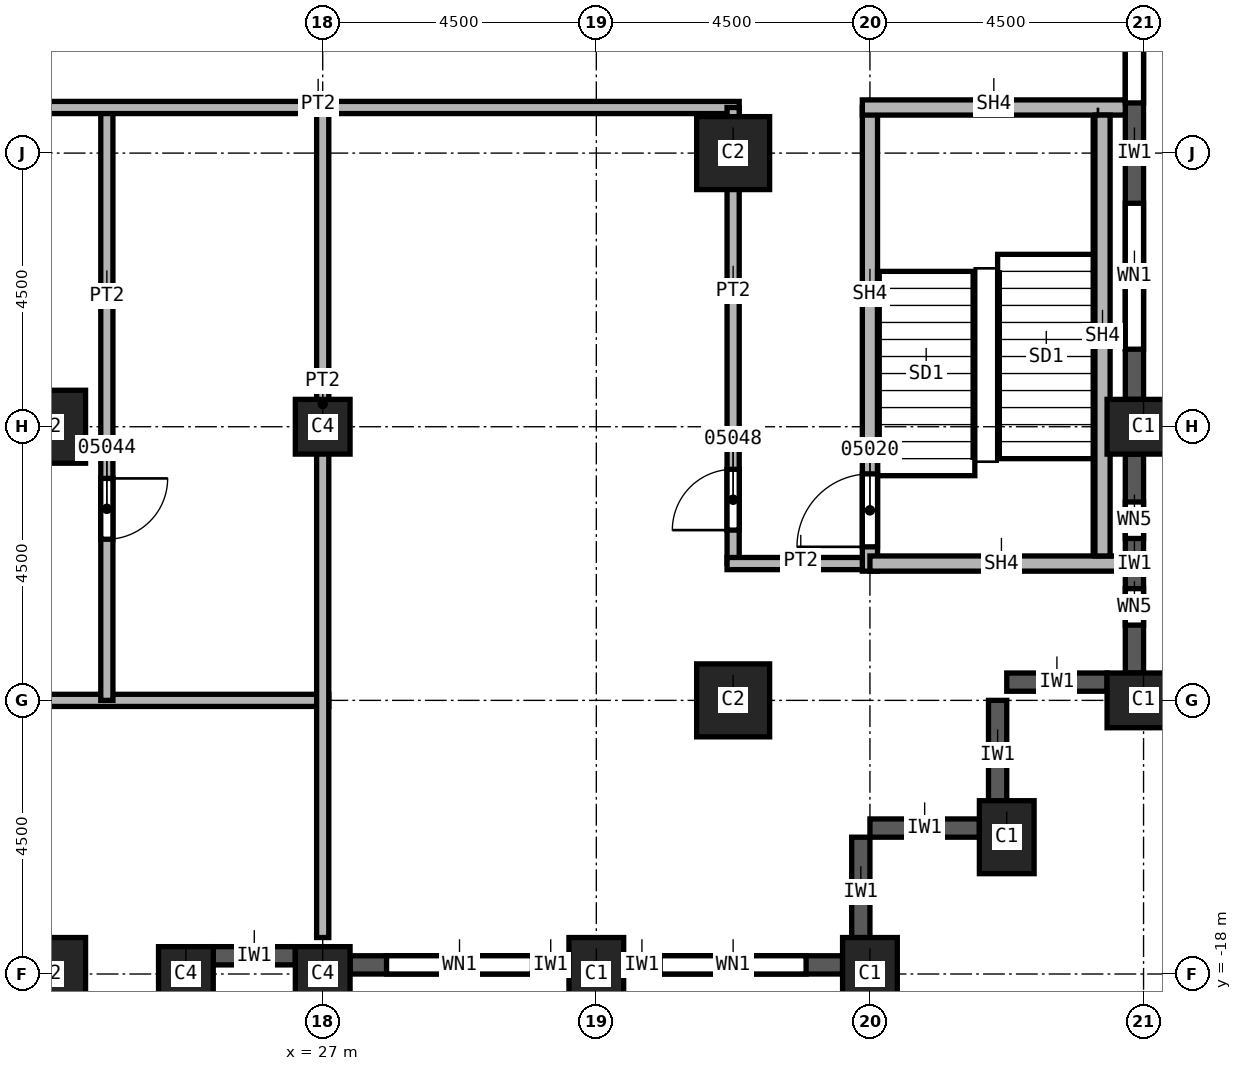
"""IFC4 building model, lengths in metres.
Left out: names, types, materials, properties, quantities, classifications, styles, units other than length and angle.
Written with IfcOpenShell. Run it as: python <this file> out.ifc"""

import sys

from ifc_helpers import new_model, si_unit, direction, frame, frame_2d, origin, origin_2d, place, context, subcontext, project, spatial, rectangle, extrude, element, fill, save


model = new_model("IFC4")
c1 = context("Model", 3, precision=1e-05, world=origin(), true_north=direction((0.0, 1.0)))
c2 = subcontext(c1, "Body", "Model", "MODEL_VIEW")
j1 = project(units=[si_unit("LENGTHUNIT", "METRE"), si_unit("PLANEANGLEUNIT", "RADIAN")], contexts=[c1])
p1 = place(None, origin())
s1 = spatial("IfcSite", under=j1, at=p1, CompositionType="ELEMENT")
p2 = place(p1, origin())
s2 = spatial("IfcBuilding", under=s1, at=p2, CompositionType="ELEMENT")
p3 = place(p2, frame((0.0, 0.0, 112.0)))
s3 = spatial("IfcBuildingStorey", under=s2, at=p3, CompositionType="ELEMENT", Elevation=112.0)
for number, where, z_axis, x_axis in (
    (1, (40.5, -9.0, 0.0), (0.0, 0.0, 1.0), (0.0, 1.0, 0.0)),
    (2, (40.5, -13.5, 0.0), (0.0, 0.0, 1.0), (0.0, 1.0, 0.0)),
    (3, (38.25, -15.75, 0.0), (0.0, 0.0, 1.0), (1.0, 0.0, 0.0)),
    (4, (31.5, -18.0, 0.0), (0.0, 0.0, 1.0), (1.0, 0.0, 0.0)),
    (5, (36.0, -18.0, 0.0), (0.0, 0.0, 1.0), (1.0, 0.0, 0.0)),
):
    element("IfcColumn", number, at=place(p3, frame(where, z_axis=z_axis, x_axis=x_axis)), inside=s3, PredefinedType="COLUMN", context=c2, shape_type="SweptSolid", body=[
        extrude(rectangle(XDim=0.9, YDim=1.2, at=origin_2d()), origin(), (0.0, 0.0, 1.0), 3.7),
    ])
for number, where, z_axis, x_axis in (
    (6, (33.75, -4.5, 0.0), (0.0, 0.0, 1.0), (1.0, 0.0, 0.0)),
    (7, (33.75, -13.5, 0.0), (0.0, 0.0, 1.0), (1.0, 0.0, 0.0)),
    (8, (22.5, -9.0, 0.0), (0.0, 0.0, 1.0), (1.0, 0.0, 0.0)),
    (9, (22.5, -18.0, 0.0), (0.0, 0.0, 1.0), (1.0, 0.0, 0.0)),
):
    element("IfcColumn", number, at=place(p3, frame(where, z_axis=z_axis, x_axis=x_axis)), inside=s3, PredefinedType="COLUMN", context=c2, shape_type="SweptSolid", body=[
        extrude(rectangle(XDim=1.2, YDim=1.2, at=origin_2d()), origin(), (0.0, 0.0, 1.0), 3.7),
    ])
for number, where, z_axis, x_axis in (
    (10, (27.0, -9.0, 0.0), (0.0, 0.0, 1.0), (1.0, 0.0, 0.0)),
    (11, (27.0, -18.0, 0.0), (0.0, 0.0, 1.0), (1.0, 0.0, 0.0)),
    (12, (24.75, -18.0, 0.0), (0.0, 0.0, 1.0), (1.0, 0.0, 0.0)),
):
    element("IfcColumn", number, at=place(p3, frame(where, z_axis=z_axis, x_axis=x_axis)), inside=s3, PredefinedType="COLUMN", context=c2, shape_type="SweptSolid", body=[
        extrude(rectangle(XDim=0.9, YDim=0.9, at=origin_2d()), origin(), (0.0, 0.0, 1.0), 3.7),
    ])
for number, where, z_axis, x_axis in (
    (13, (35.85, -17.55, 0.0), (0.0, 0.0, 1.0), (0.0, 1.0, 0.0)),
    (14, (37.8, -15.6, 0.0), (0.0, 0.0, 1.0), (-1.0, 0.0, 0.0)),
    (15, (38.1, -15.3, 0.0), (0.0, 0.0, 1.0), (0.0, 1.0, 0.0)),
):
    element("IfcWall", number, at=place(p3, frame(where, z_axis=z_axis, x_axis=x_axis)), inside=s3, PredefinedType="SOLIDWALL", context=c2, shape_type="SweptSolid", body=[
        extrude(rectangle(XDim=1.8, YDim=0.3, at=frame_2d((0.9, 0.0))), origin(), (0.0, 0.0, 1.0), 3.1),
    ])
p4 = place(p3, frame((39.9, -13.2, 0.0), z_axis=(0.0, 0.0, 1.0), x_axis=(-1.0, 0.0, 0.0)))
e16 = element("IfcWall", 16, at=p4, inside=s3, PredefinedType="SOLIDWALL", context=c2, shape_type="SweptSolid", body=[
    extrude(rectangle(XDim=1.65, YDim=0.3, at=frame_2d((0.825, 0.0))), origin(), (0.0, 0.0, 1.0), 3.1),
])
p5 = place(p3, frame((25.2, -17.7, 0.0), z_axis=(0.0, 0.0, 1.0), x_axis=(1.0, 0.0, 0.0)))
e17 = element("IfcWall", 17, at=p5, inside=s3, PredefinedType="SOLIDWALL", context=c2, shape_type="SweptSolid", body=[
    extrude(rectangle(XDim=1.35, YDim=0.3, at=frame_2d((0.675, 0.0))), origin(), (0.0, 0.0, 1.0), 3.1),
])
p6 = place(p3, frame((27.45, -17.85, 0.0), z_axis=(0.0, 0.0, 1.0), x_axis=(1.0, 0.0, 0.0)))
e18 = element("IfcWall", 18, at=p6, inside=s3, PredefinedType="SOLIDWALL", context=c2, shape_type="SweptSolid", body=[
    extrude(rectangle(XDim=3.6, YDim=0.3, at=frame_2d((1.8, 0.0))), origin(), (0.0, 0.0, 1.0), 3.1),
])
p7 = place(p6, frame((0.6, 0.0, 0.8)))
e19 = element("IfcOpeningElement", 19, at=p7, cuts=e18, PredefinedType="OPENING", context=c2, shape_type="SweptSolid", body=[
    extrude(rectangle(XDim=2.4, YDim=1.95, at=frame_2d((1.2, 0.975))), frame((0.0, 0.15, 0.0), z_axis=(0.0, -1.0, 0.0), x_axis=(1.0, 0.0, 0.0)), (0.0, 0.0, 1.0), 0.3),
])
p8 = place(p3, frame((31.95, -17.85, 0.0), z_axis=(0.0, 0.0, 1.0), x_axis=(1.0, 0.0, 0.0)))
e20 = element("IfcWall", 20, at=p8, inside=s3, PredefinedType="SOLIDWALL", context=c2, shape_type="SweptSolid", body=[
    extrude(rectangle(XDim=3.6, YDim=0.3, at=frame_2d((1.8, 0.0))), origin(), (0.0, 0.0, 1.0), 3.1),
])
p9 = place(p8, frame((0.6, 0.0, 0.8)))
e21 = element("IfcOpeningElement", 21, at=p9, cuts=e20, PredefinedType="OPENING", context=c2, shape_type="SweptSolid", body=[
    extrude(rectangle(XDim=2.4, YDim=1.95, at=frame_2d((1.2, 0.975))), frame((0.0, 0.15, 0.0), z_axis=(0.0, -1.0, 0.0), x_axis=(1.0, 0.0, 0.0)), (0.0, 0.0, 1.0), 0.3),
])
p10 = place(p3, frame((40.35, -13.05, 0.0), z_axis=(0.0, 0.0, 1.0), x_axis=(0.0, 1.0, 0.0)))
e22 = element("IfcWall", 22, at=p10, inside=s3, PredefinedType="SOLIDWALL", context=c2, shape_type="SweptSolid", body=[
    extrude(rectangle(XDim=3.6, YDim=0.3, at=frame_2d((1.8, 0.0))), origin(), (0.0, 0.0, 1.0), 3.1),
])
p11 = place(p10, frame((0.788, 0.0, 0.8)))
e23 = element("IfcOpeningElement", 23, at=p11, cuts=e22, PredefinedType="OPENING", context=c2, shape_type="SweptSolid", body=[
    extrude(rectangle(XDim=0.6, YDim=1.95, at=frame_2d((0.3, 0.975))), frame((0.0, 0.15, 0.0), z_axis=(0.0, -1.0, 0.0), x_axis=(1.0, 0.0, 0.0)), (0.0, 0.0, 1.0), 0.3),
])
p12 = place(p10, frame((2.212, 0.0, 0.8)))
e24 = element("IfcOpeningElement", 24, at=p12, cuts=e22, PredefinedType="OPENING", context=c2, shape_type="SweptSolid", body=[
    extrude(rectangle(XDim=0.6, YDim=1.95, at=frame_2d((0.3, 0.975))), frame((0.0, 0.15, 0.0), z_axis=(0.0, -1.0, 0.0), x_axis=(1.0, 0.0, 0.0)), (0.0, 0.0, 1.0), 0.3),
])
p13 = place(p3, frame((40.35, -8.55, 0.0), z_axis=(0.0, 0.0, 1.0), x_axis=(0.0, 1.0, 0.0)))
e25 = element("IfcWall", 25, at=p13, inside=s3, PredefinedType="SOLIDWALL", context=c2, shape_type="SweptSolid", body=[
    extrude(rectangle(XDim=8.1, YDim=0.3, at=frame_2d((4.05, 0.0))), origin(), (0.0, 0.0, 1.0), 3.1),
])
p14 = place(p13, frame((0.825, 0.0, 0.8)))
e26 = element("IfcOpeningElement", 26, at=p14, cuts=e25, PredefinedType="OPENING", context=c2, shape_type="SweptSolid", body=[
    extrude(rectangle(XDim=2.4, YDim=1.95, at=frame_2d((1.2, 0.975))), frame((0.0, 0.15, 0.0), z_axis=(0.0, -1.0, 0.0), x_axis=(1.0, 0.0, 0.0)), (0.0, 0.0, 1.0), 0.3),
])
p15 = place(p13, frame((4.875, 0.0, 0.8)))
e27 = element("IfcOpeningElement", 27, at=p15, cuts=e25, PredefinedType="OPENING", context=c2, shape_type="SweptSolid", body=[
    extrude(rectangle(XDim=2.4, YDim=1.95, at=frame_2d((1.2, 0.975))), frame((0.0, 0.15, 0.0), z_axis=(0.0, -1.0, 0.0), x_axis=(1.0, 0.0, 0.0)), (0.0, 0.0, 1.0), 0.3),
])
p16 = place(p3, frame((19.9, -13.5, 0.0), z_axis=(0.0, 0.0, 1.0), x_axis=(1.0, 0.0, 0.0)))
e28 = element("IfcWall", 28, at=p16, inside=s3, PredefinedType="PARTITIONING", context=c2, shape_type="SweptSolid", body=[
    extrude(rectangle(XDim=7.2, YDim=0.2, at=frame_2d((3.6, 0.0))), origin(), (0.0, 0.0, 1.0), 3.7),
])
p17 = place(p3, frame((23.45, -3.75, 0.0), z_axis=(0.0, 0.0, 1.0), x_axis=(0.0, -1.0, 0.0)))
e29 = element("IfcWall", 29, at=p17, inside=s3, PredefinedType="PARTITIONING", context=c2, shape_type="SweptSolid", body=[
    extrude(rectangle(XDim=9.75, YDim=0.2, at=frame_2d((4.875, 0.0))), origin(), (0.0, 0.0, 1.0), 3.7),
])
p18 = place(p17, frame((6.1, 0.0, 0.0)))
e30 = element("IfcOpeningElement", 30, at=p18, cuts=e29, PredefinedType="OPENING", context=c2, shape_type="SweptSolid", body=[
    extrude(rectangle(XDim=1.0, YDim=2.1, at=frame_2d((0.5, 1.05))), frame((0.0, 0.1, 0.0), z_axis=(0.0, -1.0, 0.0), x_axis=(1.0, 0.0, 0.0)), (0.0, 0.0, 1.0), 0.2),
])
p19 = place(p3, frame((33.85, -3.75, 0.0), z_axis=(0.0, 0.0, 1.0), x_axis=(-1.0, 0.0, 0.0)))
e31 = element("IfcWall", 31, at=p19, inside=s3, PredefinedType="PARTITIONING", context=c2, shape_type="SweptSolid", body=[
    extrude(rectangle(XDim=13.95, YDim=0.2, at=frame_2d((6.975, 0.0))), origin(), (0.0, 0.0, 1.0), 3.7),
])
p20 = place(p3, frame((27.0, -3.75, 0.0), z_axis=(0.0, 0.0, 1.0), x_axis=(0.0, -1.0, 0.0)))
e32 = element("IfcWall", 32, at=p20, inside=s3, PredefinedType="PARTITIONING", context=c2, shape_type="SweptSolid", body=[
    extrude(rectangle(XDim=13.65, YDim=0.2, at=frame_2d((6.825, 0.0))), origin(), (0.0, 0.0, 1.0), 3.7),
])
p21 = place(p3, frame((33.75, -11.25, 0.0), z_axis=(0.0, 0.0, 1.0), x_axis=(0.0, 1.0, 0.0)))
e33 = element("IfcWall", 33, at=p21, inside=s3, PredefinedType="PARTITIONING", context=c2, shape_type="SweptSolid", body=[
    extrude(rectangle(XDim=7.5, YDim=0.2, at=frame_2d((3.75, 0.0))), origin(), (0.0, 0.0, 1.0), 3.7),
])
p22 = place(p21, frame((0.55, 0.0, 0.0)))
e34 = element("IfcOpeningElement", 34, at=p22, cuts=e33, PredefinedType="OPENING", context=c2, shape_type="SweptSolid", body=[
    extrude(rectangle(XDim=1.0, YDim=2.1, at=frame_2d((0.5, 1.05))), frame((0.0, 0.1, 0.0), z_axis=(0.0, -1.0, 0.0), x_axis=(1.0, 0.0, 0.0)), (0.0, 0.0, 1.0), 0.2),
])
p23 = place(p3, frame((36.0, -11.25, 0.0), z_axis=(0.0, 0.0, 1.0), x_axis=(-1.0, 0.0, 0.0)))
e35 = element("IfcWall", 35, at=p23, inside=s3, PredefinedType="PARTITIONING", context=c2, shape_type="SweptSolid", body=[
    extrude(rectangle(XDim=2.35, YDim=0.2, at=frame_2d((1.175, 0.0))), origin(), (0.0, 0.0, 1.0), 3.7),
])
p24 = place(p3, frame((36.0, -11.375, 0.0), z_axis=(0.0, 0.0, 1.0), x_axis=(0.0, 1.0, 0.0)))
e36 = element("IfcWall", 36, at=p24, inside=s3, PredefinedType="SOLIDWALL", context=c2, shape_type="SweptSolid", body=[
    extrude(rectangle(XDim=7.625, YDim=0.25, at=frame_2d((3.812, 0.0))), origin(), (0.0, 0.0, 1.0), 3.7),
])
p25 = place(p24, frame((0.4, 0.0, 0.0)))
e37 = element("IfcOpeningElement", 37, at=p25, cuts=e36, PredefinedType="OPENING", context=c2, shape_type="SweptSolid", body=[
    extrude(rectangle(XDim=1.2, YDim=2.1, at=frame_2d((0.6, 1.05))), frame((0.0, 0.125, 0.0), z_axis=(0.0, -1.0, 0.0), x_axis=(1.0, 0.0, 0.0)), (0.0, 0.0, 1.0), 0.25),
])
p26 = place(p3, frame((40.2, -11.25, 0.0), z_axis=(0.0, 0.0, 1.0), x_axis=(-1.0, 0.0, 0.0)))
e38 = element("IfcWall", 38, at=p26, inside=s3, PredefinedType="SOLIDWALL", context=c2, shape_type="SweptSolid", body=[
    extrude(rectangle(XDim=4.2, YDim=0.25, at=frame_2d((2.1, 0.0))), origin(), (0.0, 0.0, 1.0), 3.7),
])
p27 = place(p3, frame((40.2, -3.75, 0.0), z_axis=(0.0, 0.0, 1.0), x_axis=(-1.0, 0.0, 0.0)))
e39 = element("IfcWall", 39, at=p27, inside=s3, PredefinedType="SOLIDWALL", context=c2, shape_type="SweptSolid", body=[
    extrude(rectangle(XDim=4.325, YDim=0.25, at=frame_2d((2.163, 0.0))), origin(), (0.0, 0.0, 1.0), 3.7),
])
p28 = place(p3, frame((39.825, -11.125, 0.0), z_axis=(0.0, 0.0, 1.0), x_axis=(0.0, 1.0, 0.0)))
e40 = element("IfcWall", 40, at=p28, inside=s3, PredefinedType="SOLIDWALL", context=c2, shape_type="SweptSolid", body=[
    extrude(rectangle(XDim=7.25, YDim=0.25, at=frame_2d((3.625, 0.0))), origin(), (0.0, 0.0, 1.0), 3.7),
])
p29 = place(p7, origin())
e41 = element("IfcWindow", 41, at=p29, inside=s3, PartitioningType="SINGLE_PANEL", PredefinedType="WINDOW", context=c2, shape_type="SweptSolid", body=[
    extrude(rectangle(XDim=2.4, YDim=1.95, at=frame_2d((1.2, 0.975))), frame((0.0, 0.03, 0.0), z_axis=(0.0, -1.0, 0.0), x_axis=(1.0, 0.0, 0.0)), (0.0, 0.0, 1.0), 0.06),
])
fill(e19, e41)
p30 = place(p9, origin())
e42 = element("IfcWindow", 42, at=p30, inside=s3, PartitioningType="SINGLE_PANEL", PredefinedType="WINDOW", context=c2, shape_type="SweptSolid", body=[
    extrude(rectangle(XDim=2.4, YDim=1.95, at=frame_2d((1.2, 0.975))), frame((0.0, 0.03, 0.0), z_axis=(0.0, -1.0, 0.0), x_axis=(1.0, 0.0, 0.0)), (0.0, 0.0, 1.0), 0.06),
])
fill(e21, e42)
p31 = place(p14, origin())
e43 = element("IfcWindow", 43, at=p31, inside=s3, PartitioningType="SINGLE_PANEL", PredefinedType="WINDOW", context=c2, shape_type="SweptSolid", body=[
    extrude(rectangle(XDim=2.4, YDim=1.95, at=frame_2d((1.2, 0.975))), frame((0.0, 0.03, 0.0), z_axis=(0.0, -1.0, 0.0), x_axis=(1.0, 0.0, 0.0)), (0.0, 0.0, 1.0), 0.06),
])
fill(e26, e43)
p32 = place(p15, origin())
e44 = element("IfcWindow", 44, at=p32, inside=s3, PartitioningType="SINGLE_PANEL", PredefinedType="WINDOW", context=c2, shape_type="SweptSolid", body=[
    extrude(rectangle(XDim=2.4, YDim=1.95, at=frame_2d((1.2, 0.975))), frame((0.0, 0.03, 0.0), z_axis=(0.0, -1.0, 0.0), x_axis=(1.0, 0.0, 0.0)), (0.0, 0.0, 1.0), 0.06),
])
fill(e27, e44)
p33 = place(p25, origin())
e45 = element("IfcDoor", 45, at=p33, inside=s3, OperationType="SINGLE_SWING_LEFT", PredefinedType="DOOR", context=c2, shape_type="SweptSolid", body=[
    extrude(rectangle(XDim=1.2, YDim=2.1, at=frame_2d((0.6, 1.05))), frame((0.0, 0.025, 0.0), z_axis=(0.0, -1.0, 0.0), x_axis=(1.0, 0.0, 0.0)), (0.0, 0.0, 1.0), 0.05),
])
fill(e37, e45)
p34 = place(p18, origin())
e46 = element("IfcDoor", 46, at=p34, inside=s3, OperationType="SINGLE_SWING_LEFT", PredefinedType="DOOR", context=c2, shape_type="SweptSolid", body=[
    extrude(rectangle(XDim=1.0, YDim=2.1, at=frame_2d((0.5, 1.05))), frame((0.0, 0.025, 0.0), z_axis=(0.0, -1.0, 0.0), x_axis=(1.0, 0.0, 0.0)), (0.0, 0.0, 1.0), 0.05),
])
fill(e30, e46)
p35 = place(p22, origin())
e47 = element("IfcDoor", 47, at=p35, inside=s3, OperationType="SINGLE_SWING_LEFT", PredefinedType="DOOR", context=c2, shape_type="SweptSolid", body=[
    extrude(rectangle(XDim=1.0, YDim=2.1, at=frame_2d((0.5, 1.05))), frame((0.0, 0.025, 0.0), z_axis=(0.0, -1.0, 0.0), x_axis=(1.0, 0.0, 0.0)), (0.0, 0.0, 1.0), 0.05),
])
fill(e34, e47)
p36 = place(p11, origin())
e48 = element("IfcWindow", 48, at=p36, inside=s3, PartitioningType="SINGLE_PANEL", PredefinedType="WINDOW", context=c2, shape_type="SweptSolid", body=[
    extrude(rectangle(XDim=0.6, YDim=1.95, at=frame_2d((0.3, 0.975))), frame((0.0, 0.03, 0.0), z_axis=(0.0, -1.0, 0.0), x_axis=(1.0, 0.0, 0.0)), (0.0, 0.0, 1.0), 0.06),
])
fill(e23, e48)
p37 = place(p12, origin())
e49 = element("IfcWindow", 49, at=p37, inside=s3, PartitioningType="SINGLE_PANEL", PredefinedType="WINDOW", context=c2, shape_type="SweptSolid", body=[
    extrude(rectangle(XDim=0.6, YDim=1.95, at=frame_2d((0.3, 0.975))), frame((0.0, 0.03, 0.0), z_axis=(0.0, -1.0, 0.0), x_axis=(1.0, 0.0, 0.0)), (0.0, 0.0, 1.0), 0.06),
])
fill(e24, e49)
save(model, sys.argv[1])
